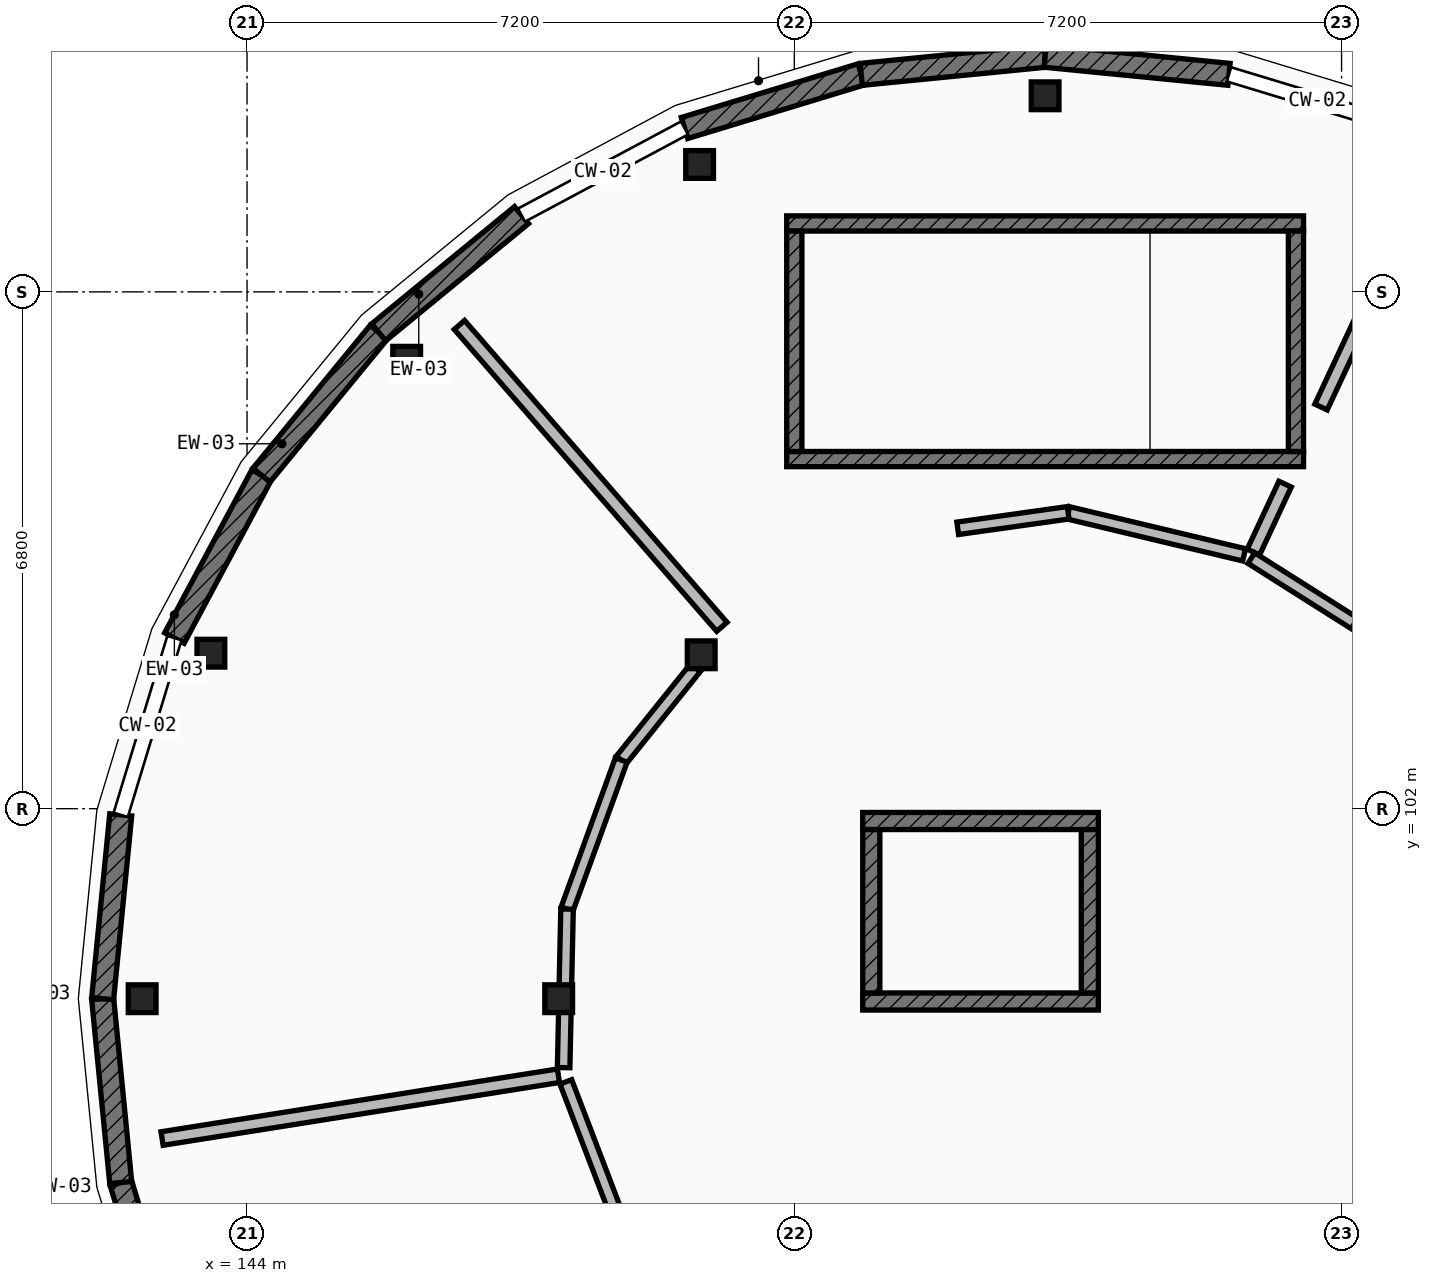
"""IFC4 building model, lengths in metres.
Left out: names, types, materials, properties, quantities, classifications, styles, units other than length and angle.
Written with IfcOpenShell. Run it as: python <this file> out.ifc"""

import sys

from ifc_helpers import new_model, si_unit, direction, frame, frame_2d, origin, origin_2d, place, context, subcontext, project, spatial, rectangle, extrude, element, fill, save


model = new_model("IFC4")
c1 = context("Model", 3, precision=1e-05, world=origin(), true_north=direction((0.0, 1.0)))
c2 = subcontext(c1, "Body", "Model", "MODEL_VIEW")
j1 = project(units=[si_unit("LENGTHUNIT", "METRE"), si_unit("PLANEANGLEUNIT", "RADIAN")], contexts=[c1])
p1 = place(None, origin())
s1 = spatial("IfcSite", under=j1, at=p1, CompositionType="ELEMENT")
p2 = place(p1, origin())
s2 = spatial("IfcBuilding", under=s1, at=p2, CompositionType="ELEMENT")
p3 = place(p2, frame((0.0, 0.0, 8.75)))
s3 = spatial("IfcBuildingStorey", under=s2, at=p3, CompositionType="ELEMENT", Elevation=8.75)
for number, where, z_axis, x_axis in (
    (1, (154.5, 111.38, 0.0), (0.0, 0.0, 1.0), (1.0, 0.0, 0.0)),
    (2, (149.954, 110.476, 0.0), (0.0, 0.0, 1.0), (1.0, 0.0, 0.0)),
    (3, (146.1, 107.9, 0.0), (0.0, 0.0, 1.0), (1.0, 0.0, 0.0)),
    (4, (143.524, 104.046, 0.0), (0.0, 0.0, 1.0), (1.0, 0.0, 0.0)),
    (5, (142.62, 99.5, 0.0), (0.0, 0.0, 1.0), (1.0, 0.0, 0.0)),
    (6, (149.975, 104.025, 0.0), (0.0, 0.0, 1.0), (1.0, 0.0, 0.0)),
    (7, (148.1, 99.5, 0.0), (0.0, 0.0, 1.0), (1.0, 0.0, 0.0)),
):
    element("IfcColumn", number, at=place(p3, frame(where, z_axis=z_axis, x_axis=x_axis)), inside=s3, PredefinedType="COLUMN", context=c2, shape_type="SweptSolid", body=[
        extrude(rectangle(XDim=0.365, YDim=0.365, at=origin_2d()), origin(), (0.0, 0.0, 1.0), 4.2),
    ])
p4 = place(p3, frame((143.044, 94.755, 0.0), z_axis=(0.0, 0.0, 1.0), x_axis=(-0.290442193951, 0.956892539407, 0.0)))
e8 = element("IfcWall", 8, at=p4, inside=s3, PredefinedType="ELEMENTEDWALL", context=c2, shape_type="SweptSolid", body=[
    extrude(rectangle(XDim=2.431, YDim=0.29, at=frame_2d((1.215, 0.0))), origin(), (0.0, 0.0, 1.0), 3.329),
])
p5 = place(p4, frame((0.565, 0.0, 0.85)))
e9 = element("IfcOpeningElement", 9, at=p5, cuts=e8, PredefinedType="OPENING", context=c2, shape_type="SweptSolid", body=[
    extrude(rectangle(XDim=1.3, YDim=2.0, at=frame_2d((0.65, 1.0))), frame((0.0, 0.155, 0.0), z_axis=(0.0, -1.0, 0.0), x_axis=(1.0, 0.0, 0.0)), (0.0, 0.0, 1.0), 0.31),
])
p6 = place(p3, frame((142.338, 97.081, 0.0), z_axis=(0.0, 0.0, 1.0), x_axis=(-0.097832820839, 0.995202863323, 0.0)))
e10 = element("IfcWall", 10, at=p6, inside=s3, PredefinedType="ELEMENTEDWALL", context=c2, shape_type="SweptSolid", body=[
    extrude(rectangle(XDim=2.431, YDim=0.29, at=frame_2d((1.215, 0.0))), origin(), (0.0, 0.0, 1.0), 3.329),
])
p7 = place(p6, frame((0.565, 0.0, 0.7)))
e11 = element("IfcOpeningElement", 11, at=p7, cuts=e10, PredefinedType="OPENING", context=c2, shape_type="SweptSolid", body=[
    extrude(rectangle(XDim=1.3, YDim=2.3, at=frame_2d((0.65, 1.15))), frame((0.0, 0.155, 0.0), z_axis=(0.0, -1.0, 0.0), x_axis=(1.0, 0.0, 0.0)), (0.0, 0.0, 1.0), 0.31),
])
p8 = place(p3, frame((142.1, 99.5, 0.0), z_axis=(0.0, 0.0, 1.0), x_axis=(0.097832820839, 0.995202863323, 0.0)))
e12 = element("IfcWall", 12, at=p8, inside=s3, PredefinedType="ELEMENTEDWALL", context=c2, shape_type="SweptSolid", body=[
    extrude(rectangle(XDim=2.431, YDim=0.29, at=frame_2d((1.215, 0.0))), origin(), (0.0, 0.0, 1.0), 3.329),
])
p9 = place(p8, frame((0.555, 0.0, 0.85)))
e13 = element("IfcOpeningElement", 13, at=p9, cuts=e12, PredefinedType="OPENING", context=c2, shape_type="SweptSolid", body=[
    extrude(rectangle(XDim=1.32, YDim=1.55, at=frame_2d((0.66, 0.775))), frame((0.0, 0.155, 0.0), z_axis=(0.0, -1.0, 0.0), x_axis=(1.0, 0.0, 0.0)), (0.0, 0.0, 1.0), 0.31),
])
p10 = place(p3, frame((143.044, 104.245, 0.0), z_axis=(0.0, 0.0, 1.0), x_axis=(0.471432490996, 0.881902152415, 0.0)))
e14 = element("IfcWall", 14, at=p10, inside=s3, PredefinedType="ELEMENTEDWALL", context=c2, shape_type="SweptSolid", body=[
    extrude(rectangle(XDim=2.431, YDim=0.29, at=frame_2d((1.215, 0.0))), origin(), (0.0, 0.0, 1.0), 3.329),
])
p11 = place(p10, frame((0.541, 0.0, 0.85)))
e15 = element("IfcOpeningElement", 15, at=p11, cuts=e14, PredefinedType="OPENING", context=c2, shape_type="SweptSolid", body=[
    extrude(rectangle(XDim=1.35, YDim=1.55, at=frame_2d((0.675, 0.775))), frame((0.0, 0.155, 0.0), z_axis=(0.0, -1.0, 0.0), x_axis=(1.0, 0.0, 0.0)), (0.0, 0.0, 1.0), 0.31),
])
p12 = place(p3, frame((144.19, 106.389, 0.0), z_axis=(0.0, 0.0, 1.0), x_axis=(0.634347392822, 0.773048113134, 0.0)))
e16 = element("IfcWall", 16, at=p12, inside=s3, PredefinedType="ELEMENTEDWALL", context=c2, shape_type="SweptSolid", body=[
    extrude(rectangle(XDim=2.431, YDim=0.29, at=frame_2d((1.215, 0.0))), origin(), (0.0, 0.0, 1.0), 3.329),
])
p13 = place(p12, frame((0.54, 0.0, 0.85)))
e17 = element("IfcOpeningElement", 17, at=p13, cuts=e16, PredefinedType="OPENING", context=c2, shape_type="SweptSolid", body=[
    extrude(rectangle(XDim=1.35, YDim=1.85, at=frame_2d((0.675, 0.925))), frame((0.0, 0.155, 0.0), z_axis=(0.0, -1.0, 0.0), x_axis=(1.0, 0.0, 0.0)), (0.0, 0.0, 1.0), 0.31),
])
p14 = place(p3, frame((145.732, 108.268, 0.0), z_axis=(0.0, 0.0, 1.0), x_axis=(0.773048113134, 0.634347392822, 0.0)))
e18 = element("IfcWall", 18, at=p14, inside=s3, PredefinedType="ELEMENTEDWALL", context=c2, shape_type="SweptSolid", body=[
    extrude(rectangle(XDim=2.431, YDim=0.29, at=frame_2d((1.215, 0.0))), origin(), (0.0, 0.0, 1.0), 3.329),
])
p15 = place(p14, frame((0.54, 0.0, 0.85)))
e19 = element("IfcOpeningElement", 19, at=p15, cuts=e18, PredefinedType="OPENING", context=c2, shape_type="SweptSolid", body=[
    extrude(rectangle(XDim=1.35, YDim=2.15, at=frame_2d((0.675, 1.075))), frame((0.0, 0.155, 0.0), z_axis=(0.0, -1.0, 0.0), x_axis=(1.0, 0.0, 0.0)), (0.0, 0.0, 1.0), 0.31),
])
p16 = place(p3, frame((149.755, 110.956, 0.0), z_axis=(0.0, 0.0, 1.0), x_axis=(0.956892539407, 0.290442193951, 0.0)))
e20 = element("IfcWall", 20, at=p16, inside=s3, PredefinedType="ELEMENTEDWALL", context=c2, shape_type="SweptSolid", body=[
    extrude(rectangle(XDim=2.431, YDim=0.29, at=frame_2d((1.215, 0.0))), origin(), (0.0, 0.0, 1.0), 3.329),
])
p17 = place(p16, frame((0.525, 0.0, 0.85)))
e21 = element("IfcOpeningElement", 21, at=p17, cuts=e20, PredefinedType="OPENING", context=c2, shape_type="SweptSolid", body=[
    extrude(rectangle(XDim=1.38, YDim=1.7, at=frame_2d((0.69, 0.85))), frame((0.0, 0.155, 0.0), z_axis=(0.0, -1.0, 0.0), x_axis=(1.0, 0.0, 0.0)), (0.0, 0.0, 1.0), 0.31),
])
for number, where, z_axis, x_axis in (
    (22, (152.081, 111.662, 0.0), (0.0, 0.0, 1.0), (0.995, 0.098, 0.0)),
    (23, (154.5, 111.9, 0.0), (0.0, 0.0, 1.0), (0.995, -0.098, 0.0)),
):
    element("IfcWall", number, at=place(p3, frame(where, z_axis=z_axis, x_axis=x_axis)), inside=s3, PredefinedType="ELEMENTEDWALL", context=c2, shape_type="SweptSolid", body=[
        extrude(rectangle(XDim=2.431, YDim=0.29, at=frame_2d((1.215, 0.0))), origin(), (0.0, 0.0, 1.0), 3.329),
    ])
p18 = place(p3, frame((151.1, 106.6, 0.0), z_axis=(0.0, 0.0, 1.0), x_axis=(1.0, 0.0, 0.0)))
e24 = element("IfcWall", 24, at=p18, inside=s3, PredefinedType="SHEAR", context=c2, shape_type="SweptSolid", body=[
    extrude(rectangle(XDim=6.8, YDim=0.2, at=frame_2d((3.4, 0.0))), origin(), (0.0, 0.0, 1.0), 3.975),
])
p19 = place(p18, frame((0.38, 0.0, 0.0)))
e25 = element("IfcOpeningElement", 25, at=p19, cuts=e24, PredefinedType="OPENING", context=c2, shape_type="SweptSolid", body=[
    extrude(rectangle(XDim=1.05, YDim=2.15, at=frame_2d((0.525, 1.075))), frame((0.0, 0.11, 0.0), z_axis=(0.0, -1.0, 0.0), x_axis=(1.0, 0.0, 0.0)), (0.0, 0.0, 1.0), 0.22),
])
p20 = place(p3, frame((151.1, 109.7, 0.0), z_axis=(0.0, 0.0, 1.0), x_axis=(1.0, 0.0, 0.0)))
e26 = element("IfcWall", 26, at=p20, inside=s3, PredefinedType="SHEAR", context=c2, shape_type="SweptSolid", body=[
    extrude(rectangle(XDim=6.8, YDim=0.2, at=frame_2d((3.4, 0.0))), origin(), (0.0, 0.0, 1.0), 3.975),
])
for number, where, z_axis, x_axis in (
    (27, (151.2, 106.7, 0.0), (0.0, 0.0, 1.0), (0.0, 1.0, 0.0)),
    (28, (157.8, 106.7, 0.0), (0.0, 0.0, 1.0), (0.0, 1.0, 0.0)),
):
    element("IfcWall", number, at=place(p3, frame(where, z_axis=z_axis, x_axis=x_axis)), inside=s3, PredefinedType="SHEAR", context=c2, shape_type="SweptSolid", body=[
        extrude(rectangle(XDim=2.9, YDim=0.2, at=frame_2d((1.45, 0.0))), origin(), (0.0, 0.0, 1.0), 3.975),
    ])
p21 = place(p3, frame((152.1, 99.463, 0.0), z_axis=(0.0, 0.0, 1.0), x_axis=(1.0, 0.0, 0.0)))
e29 = element("IfcWall", 29, at=p21, inside=s3, PredefinedType="SHEAR", context=c2, shape_type="SweptSolid", body=[
    extrude(rectangle(XDim=3.1, YDim=0.225, at=frame_2d((1.55, 0.0))), origin(), (0.0, 0.0, 1.0), 3.975),
])
p22 = place(p21, frame((0.9, 0.0, 0.0)))
e30 = element("IfcOpeningElement", 30, at=p22, cuts=e29, PredefinedType="OPENING", context=c2, shape_type="SweptSolid", body=[
    extrude(rectangle(XDim=1.3, YDim=2.2, at=frame_2d((0.65, 1.1))), frame((0.0, 0.123, 0.0), z_axis=(0.0, -1.0, 0.0), x_axis=(1.0, 0.0, 0.0)), (0.0, 0.0, 1.0), 0.245),
])
p23 = place(p3, frame((152.1, 101.838, 0.0), z_axis=(0.0, 0.0, 1.0), x_axis=(1.0, 0.0, 0.0)))
e31 = element("IfcWall", 31, at=p23, inside=s3, PredefinedType="SHEAR", context=c2, shape_type="SweptSolid", body=[
    extrude(rectangle(XDim=3.1, YDim=0.225, at=frame_2d((1.55, 0.0))), origin(), (0.0, 0.0, 1.0), 3.975),
])
for number, where, z_axis, x_axis in (
    (32, (152.213, 99.575, 0.0), (0.0, 0.0, 1.0), (0.0, 1.0, 0.0)),
    (33, (155.088, 99.575, 0.0), (0.0, 0.0, 1.0), (0.0, 1.0, 0.0)),
):
    element("IfcWall", number, at=place(p3, frame(where, z_axis=z_axis, x_axis=x_axis)), inside=s3, PredefinedType="SHEAR", context=c2, shape_type="SweptSolid", body=[
        extrude(rectangle(XDim=2.15, YDim=0.225, at=frame_2d((1.075, 0.0))), origin(), (0.0, 0.0, 1.0), 3.975),
    ])
p24 = place(p3, frame((157.24, 105.376, 0.0), z_axis=(0.0, 0.0, 1.0), x_axis=(0.422695781641, 0.906271634877, 0.0)))
e34 = element("IfcWall", 34, at=p24, inside=s3, PredefinedType="PARTITIONING", context=c2, shape_type="SweptSolid", body=[
    extrude(rectangle(XDim=0.987, YDim=0.18, at=frame_2d((0.493, 0.0))), origin(), (0.0, 0.0, 1.0), 3.304),
])
p25 = place(p3, frame((158.13, 107.285, 0.0), z_axis=(0.0, 0.0, 1.0), x_axis=(0.422830642255, 0.906208722078, 0.0)))
e35 = element("IfcWall", 35, at=p25, inside=s3, PredefinedType="PARTITIONING", context=c2, shape_type="SweptSolid", body=[
    extrude(rectangle(XDim=3.169, YDim=0.18, at=frame_2d((1.585, 0.0))), origin(), (0.0, 0.0, 1.0), 3.304),
])
p26 = place(p3, frame((150.247, 104.393, 0.0), z_axis=(0.0, 0.0, 1.0), x_axis=(-0.656100617129, 0.754673426193, 0.0)))
e36 = element("IfcWall", 36, at=p26, inside=s3, PredefinedType="PARTITIONING", context=c2, shape_type="SweptSolid", body=[
    extrude(rectangle(XDim=5.263, YDim=0.18, at=frame_2d((2.632, 0.0))), origin(), (0.0, 0.0, 1.0), 3.304),
])
p27 = place(p3, frame((148.097, 98.486, 0.0), z_axis=(0.0, 0.0, 1.0), x_axis=(-0.98768185006, -0.156475439167, 0.0)))
e37 = element("IfcWall", 37, at=p27, inside=s3, PredefinedType="PARTITIONING", context=c2, shape_type="SweptSolid", body=[
    extrude(rectangle(XDim=5.28, YDim=0.18, at=frame_2d((2.64, 0.0))), origin(), (0.0, 0.0, 1.0), 3.304),
])
p28 = place(p3, frame((157.118, 105.34, 0.0), z_axis=(0.0, 0.0, 1.0), x_axis=(-0.972635355986, 0.232336962804, 0.0)))
e38 = element("IfcWall", 38, at=p28, inside=s3, PredefinedType="PARTITIONING", context=c2, shape_type="SweptSolid", body=[
    extrude(rectangle(XDim=2.38, YDim=0.165, at=frame_2d((1.19, 0.0))), origin(), (0.0, 0.0, 1.0), 3.304),
])
p29 = place(p3, frame((154.803, 105.893, 0.0), z_axis=(0.0, 0.0, 1.0), x_axis=(-0.99027628892, -0.139114598813, 0.0)))
e39 = element("IfcWall", 39, at=p29, inside=s3, PredefinedType="PARTITIONING", context=c2, shape_type="SweptSolid", body=[
    extrude(rectangle(XDim=1.467, YDim=0.165, at=frame_2d((0.733, 0.0))), origin(), (0.0, 0.0, 1.0), 3.304),
])
p30 = place(p3, frame((149.898, 103.854, 0.0), z_axis=(0.0, 0.0, 1.0), x_axis=(-0.626089924076, -0.779750862116, 0.0)))
e40 = element("IfcWall", 40, at=p30, inside=s3, PredefinedType="PARTITIONING", context=c2, shape_type="SweptSolid", body=[
    extrude(rectangle(XDim=1.557, YDim=0.165, at=frame_2d((0.779, 0.0))), origin(), (0.0, 0.0, 1.0), 3.304),
])
p31 = place(p30, frame((0.328, 0.0, 0.0)))
e41 = element("IfcOpeningElement", 41, at=p31, cuts=e40, PredefinedType="OPENING", context=c2, shape_type="SweptSolid", body=[
    extrude(rectangle(XDim=0.9, YDim=2.1, at=frame_2d((0.45, 1.05))), frame((0.0, 0.093, 0.0), z_axis=(0.0, -1.0, 0.0), x_axis=(1.0, 0.0, 0.0)), (0.0, 0.0, 1.0), 0.185),
])
p32 = place(p3, frame((148.923, 102.64, 0.0), z_axis=(0.0, 0.0, 1.0), x_axis=(-0.34177124659, -0.939783174463, 0.0)))
e42 = element("IfcWall", 42, at=p32, inside=s3, PredefinedType="PARTITIONING", context=c2, shape_type="SweptSolid", body=[
    extrude(rectangle(XDim=2.087, YDim=0.165, at=frame_2d((1.043, 0.0))), origin(), (0.0, 0.0, 1.0), 3.304),
])
p33 = place(p3, frame((148.21, 100.679, 0.0), z_axis=(0.0, 0.0, 1.0), x_axis=(-0.02168687228, -0.999764812129, 0.0)))
e43 = element("IfcWall", 43, at=p33, inside=s3, PredefinedType="PARTITIONING", context=c2, shape_type="SweptSolid", body=[
    extrude(rectangle(XDim=1.013, YDim=0.165, at=frame_2d((0.507, 0.0))), origin(), (0.0, 0.0, 1.0), 3.304),
])
p34 = place(p3, frame((148.181, 99.331, 0.0), z_axis=(0.0, 0.0, 1.0), x_axis=(-0.021496850658, -0.999768916006, 0.0)))
e44 = element("IfcWall", 44, at=p34, inside=s3, PredefinedType="PARTITIONING", context=c2, shape_type="SweptSolid", body=[
    extrude(rectangle(XDim=0.738, YDim=0.165, at=frame_2d((0.369, 0.0))), origin(), (0.0, 0.0, 1.0), 3.304),
])
p35 = place(p3, frame((148.194, 98.405, 0.0), z_axis=(0.0, 0.0, 1.0), x_axis=(0.357004696351, -0.934102589004, 0.0)))
e45 = element("IfcWall", 45, at=p35, inside=s3, PredefinedType="PARTITIONING", context=c2, shape_type="SweptSolid", body=[
    extrude(rectangle(XDim=2.454, YDim=0.165, at=frame_2d((1.227, 0.0))), origin(), (0.0, 0.0, 1.0), 3.304),
])
p36 = place(p35, frame((0.477, 0.0, 0.0)))
e46 = element("IfcOpeningElement", 46, at=p36, cuts=e45, PredefinedType="OPENING", context=c2, shape_type="SweptSolid", body=[
    extrude(rectangle(XDim=1.5, YDim=2.3, at=frame_2d((0.75, 1.15))), frame((0.0, 0.093, 0.0), z_axis=(0.0, -1.0, 0.0), x_axis=(1.0, 0.0, 0.0)), (0.0, 0.0, 1.0), 0.185),
])
p37 = place(p3, frame((158.571, 104.438, 0.0), z_axis=(0.0, 0.0, 1.0), x_axis=(-0.84510965167, 0.53459300094, 0.0)))
e47 = element("IfcWall", 47, at=p37, inside=s3, PredefinedType="PARTITIONING", context=c2, shape_type="SweptSolid", body=[
    extrude(rectangle(XDim=1.607, YDim=0.165, at=frame_2d((0.804, 0.0))), origin(), (0.0, 0.0, 1.0), 3.304),
])
p38 = place(p37, frame((0.333, 0.0, 0.0)))
e48 = element("IfcOpeningElement", 48, at=p38, cuts=e47, PredefinedType="OPENING", context=c2, shape_type="SweptSolid", body=[
    extrude(rectangle(XDim=0.94, YDim=2.1, at=frame_2d((0.47, 1.05))), frame((0.0, 0.093, 0.0), z_axis=(0.0, -1.0, 0.0), x_axis=(1.0, 0.0, 0.0)), (0.0, 0.0, 1.0), 0.185),
])
p39 = place(p7, origin())
e49 = element("IfcWindow", 49, at=p39, inside=s3, PartitioningType="SINGLE_PANEL", PredefinedType="WINDOW", context=c2, shape_type="SweptSolid", body=[
    extrude(rectangle(XDim=1.3, YDim=2.3, at=frame_2d((0.65, 1.15))), frame((0.0, 0.03, 0.0), z_axis=(0.0, -1.0, 0.0), x_axis=(1.0, 0.0, 0.0)), (0.0, 0.0, 1.0), 0.06),
])
fill(e11, e49)
p40 = place(p9, origin())
e50 = element("IfcWindow", 50, at=p40, inside=s3, PartitioningType="SINGLE_PANEL", PredefinedType="WINDOW", context=c2, shape_type="SweptSolid", body=[
    extrude(rectangle(XDim=1.32, YDim=1.55, at=frame_2d((0.66, 0.775))), frame((0.0, 0.03, 0.0), z_axis=(0.0, -1.0, 0.0), x_axis=(1.0, 0.0, 0.0)), (0.0, 0.0, 1.0), 0.06),
])
fill(e13, e50)
p41 = place(p11, origin())
e51 = element("IfcWindow", 51, at=p41, inside=s3, PartitioningType="SINGLE_PANEL", PredefinedType="WINDOW", context=c2, shape_type="SweptSolid", body=[
    extrude(rectangle(XDim=1.35, YDim=1.55, at=frame_2d((0.675, 0.775))), frame((0.0, 0.03, 0.0), z_axis=(0.0, -1.0, 0.0), x_axis=(1.0, 0.0, 0.0)), (0.0, 0.0, 1.0), 0.06),
])
fill(e15, e51)
p42 = place(p13, origin())
e52 = element("IfcWindow", 52, at=p42, inside=s3, PartitioningType="SINGLE_PANEL", PredefinedType="WINDOW", context=c2, shape_type="SweptSolid", body=[
    extrude(rectangle(XDim=1.35, YDim=1.85, at=frame_2d((0.675, 0.925))), frame((0.0, 0.03, 0.0), z_axis=(0.0, -1.0, 0.0), x_axis=(1.0, 0.0, 0.0)), (0.0, 0.0, 1.0), 0.06),
])
fill(e17, e52)
p43 = place(p15, origin())
e53 = element("IfcWindow", 53, at=p43, inside=s3, PartitioningType="SINGLE_PANEL", PredefinedType="WINDOW", context=c2, shape_type="SweptSolid", body=[
    extrude(rectangle(XDim=1.35, YDim=2.15, at=frame_2d((0.675, 1.075))), frame((0.0, 0.03, 0.0), z_axis=(0.0, -1.0, 0.0), x_axis=(1.0, 0.0, 0.0)), (0.0, 0.0, 1.0), 0.06),
])
fill(e19, e53)
p44 = place(p17, origin())
e54 = element("IfcWindow", 54, at=p44, inside=s3, PartitioningType="SINGLE_PANEL", PredefinedType="WINDOW", context=c2, shape_type="SweptSolid", body=[
    extrude(rectangle(XDim=1.38, YDim=1.7, at=frame_2d((0.69, 0.85))), frame((0.0, 0.03, 0.0), z_axis=(0.0, -1.0, 0.0), x_axis=(1.0, 0.0, 0.0)), (0.0, 0.0, 1.0), 0.06),
])
fill(e21, e54)
p45 = place(p19, origin())
e55 = element("IfcDoor", 55, at=p45, inside=s3, OperationType="SINGLE_SWING_LEFT", PredefinedType="DOOR", context=c2, shape_type="SweptSolid", body=[
    extrude(rectangle(XDim=1.05, YDim=2.15, at=frame_2d((0.525, 1.075))), frame((0.0, 0.025, 0.0), z_axis=(0.0, -1.0, 0.0), x_axis=(1.0, 0.0, 0.0)), (0.0, 0.0, 1.0), 0.05),
])
fill(e25, e55)
p46 = place(p22, origin())
e56 = element("IfcDoor", 56, at=p46, inside=s3, OperationType="DOUBLE_DOOR_SLIDING", PredefinedType="DOOR", context=c2, shape_type="SweptSolid", body=[
    extrude(rectangle(XDim=1.3, YDim=2.2, at=frame_2d((0.65, 1.1))), frame((0.0, 0.025, 0.0), z_axis=(0.0, -1.0, 0.0), x_axis=(1.0, 0.0, 0.0)), (0.0, 0.0, 1.0), 0.05),
])
fill(e30, e56)
p47 = place(p31, origin())
e57 = element("IfcDoor", 57, at=p47, inside=s3, OperationType="SINGLE_SWING_LEFT", PredefinedType="DOOR", context=c2, shape_type="SweptSolid", body=[
    extrude(rectangle(XDim=0.9, YDim=2.1, at=frame_2d((0.45, 1.05))), frame((0.0, 0.025, 0.0), z_axis=(0.0, -1.0, 0.0), x_axis=(1.0, 0.0, 0.0)), (0.0, 0.0, 1.0), 0.05),
])
fill(e41, e57)
p48 = place(p36, origin())
e58 = element("IfcDoor", 58, at=p48, inside=s3, OperationType="SINGLE_SWING_RIGHT", PredefinedType="DOOR", context=c2, shape_type="SweptSolid", body=[
    extrude(rectangle(XDim=1.5, YDim=2.3, at=frame_2d((0.75, 1.15))), frame((0.0, 0.025, 0.0), z_axis=(0.0, -1.0, 0.0), x_axis=(1.0, 0.0, 0.0)), (0.0, 0.0, 1.0), 0.05),
])
fill(e46, e58)
p49 = place(p38, origin())
e59 = element("IfcDoor", 59, at=p49, inside=s3, OperationType="SINGLE_SWING_RIGHT", PredefinedType="DOOR", context=c2, shape_type="SweptSolid", body=[
    extrude(rectangle(XDim=0.94, YDim=2.1, at=frame_2d((0.47, 1.05))), frame((0.0, 0.025, 0.0), z_axis=(0.0, -1.0, 0.0), x_axis=(1.0, 0.0, 0.0)), (0.0, 0.0, 1.0), 0.05),
])
fill(e48, e59)
save(model, sys.argv[1])
